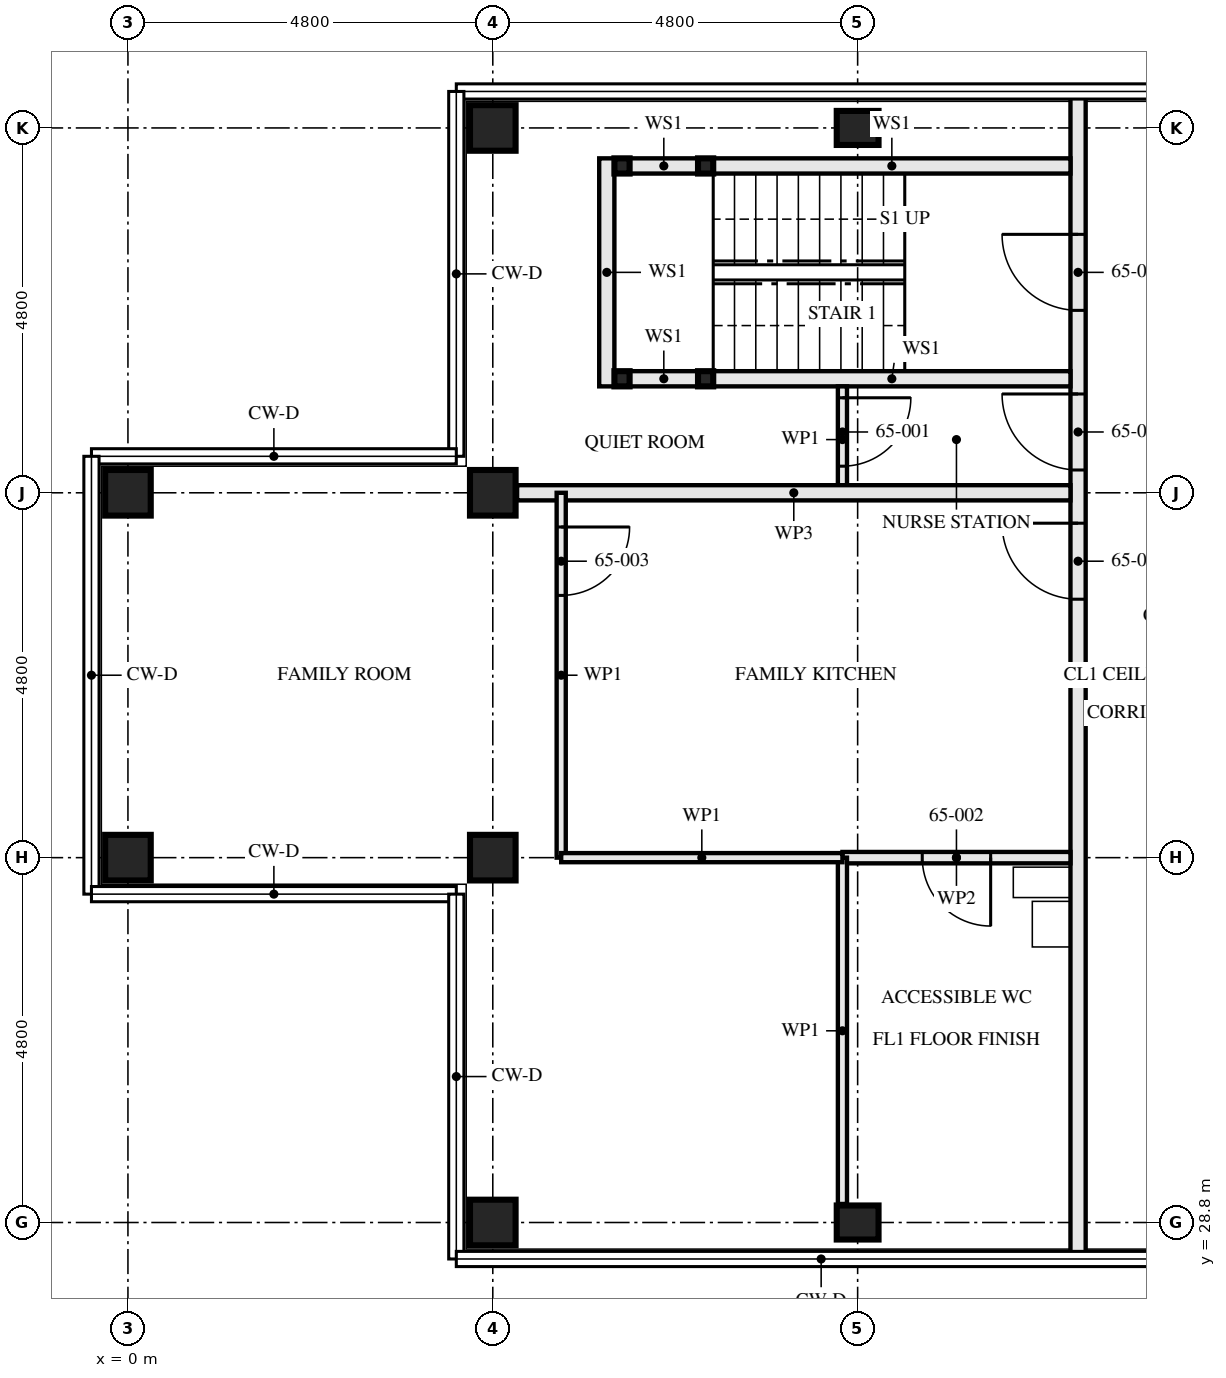
"""IFC4 building model, lengths in metres.
Left out: names, types, materials, properties, quantities, classifications, styles, units other than length and angle.
Written with IfcOpenShell. Run it as: python <this file> out.ifc"""

import sys

from ifc_helpers import new_model, si_unit, direction, frame, frame_2d, origin, origin_2d, place, context, subcontext, project, spatial, rectangle, hollow_rectangle, i_section, extrude, element, fill, save


model = new_model("IFC4")
c1 = context("Model", 3, precision=1e-05, world=origin(), true_north=direction((0.0, 1.0)))
c2 = subcontext(c1, "Body", "Model", "MODEL_VIEW")
j1 = project(units=[si_unit("LENGTHUNIT", "METRE"), si_unit("PLANEANGLEUNIT", "RADIAN")], contexts=[c1])
p1 = place(None, origin())
s1 = spatial("IfcSite", under=j1, at=p1, CompositionType="ELEMENT")
p2 = place(p1, origin())
s2 = spatial("IfcBuilding", under=s1, at=p2, CompositionType="ELEMENT")
p3 = place(p2, frame((0.0, 0.0, 236.5)))
s3 = spatial("IfcBuildingStorey", under=s2, at=p3, CompositionType="ELEMENT", Elevation=236.5)
for number, where, z_axis, x_axis in (
    (1, (0.0, 33.6, 0.0), (0.0, 0.0, 1.0), (0.0, 1.0, 0.0)),
    (2, (0.0, 38.4, 0.0), (0.0, 0.0, 1.0), (0.0, 1.0, 0.0)),
    (3, (4.8, 28.8, 0.0), (0.0, 0.0, 1.0), (0.0, 1.0, 0.0)),
    (4, (4.8, 33.6, 0.0), (0.0, 0.0, 1.0), (0.0, 1.0, 0.0)),
    (5, (4.8, 38.4, 0.0), (0.0, 0.0, 1.0), (0.0, 1.0, 0.0)),
    (6, (4.8, 43.2, 0.0), (0.0, 0.0, 1.0), (0.0, 1.0, 0.0)),
):
    element("IfcColumn", number, at=place(p3, frame(where, z_axis=z_axis, x_axis=x_axis)), inside=s3, PredefinedType="COLUMN", context=c2, shape_type="SweptSolid", body=[
        extrude(hollow_rectangle(XDim=0.6, YDim=0.6, WallThickness=0.05, at=origin_2d()), origin(), (0.0, 0.0, 1.0), 3.5),
    ])
for number, where, z_axis, x_axis in (
    (7, (9.6, 28.8, 0.0), (0.0, 0.0, 1.0), (0.0, 1.0, 0.0)),
    (8, (9.6, 43.2, 0.0), (0.0, 0.0, 1.0), (0.0, 1.0, 0.0)),
):
    element("IfcColumn", number, at=place(p3, frame(where, z_axis=z_axis, x_axis=x_axis)), inside=s3, PredefinedType="COLUMN", context=c2, shape_type="SweptSolid", body=[
        extrude(i_section(OverallWidth=0.448, OverallDepth=0.55, WebThickness=0.072, FlangeThickness=0.115, FilletRadius=0.015, at=origin_2d()), origin(), (0.0, 0.0, 1.0), 3.5),
    ])
for number, where, z_axis, x_axis in (
    (9, (6.5, 42.7, 0.0), (0.0, 0.0, 1.0), (1.0, 0.0, 0.0)),
    (10, (6.5, 39.9, 0.0), (0.0, 0.0, 1.0), (1.0, 0.0, 0.0)),
    (11, (7.6, 42.7, 0.0), (0.0, 0.0, 1.0), (1.0, 0.0, 0.0)),
    (12, (7.6, 39.9, 0.0), (0.0, 0.0, 1.0), (1.0, 0.0, 0.0)),
):
    element("IfcColumn", number, at=place(p3, frame(where, z_axis=z_axis, x_axis=x_axis)), inside=s3, PredefinedType="COLUMN", context=c2, shape_type="SweptSolid", body=[
        extrude(hollow_rectangle(XDim=0.2, YDim=0.2, WallThickness=0.008, at=origin_2d()), origin(), (0.0, 0.0, 1.0), 3.33),
    ])
p4 = place(p3, frame((6.6, 42.7, 0.0), z_axis=(0.0, 0.0, 1.0), x_axis=(1.0, 0.0, 0.0)))
e13 = element("IfcWall", 13, at=p4, inside=s3, PredefinedType="SOLIDWALL", context=c2, shape_type="SweptSolid", body=[
    extrude(rectangle(XDim=0.9, YDim=0.2, at=frame_2d((0.45, 0.0))), origin(), (0.0, 0.0, 1.0), 2.99),
])
p5 = place(p3, frame((7.7, 42.7, 0.0), z_axis=(0.0, 0.0, 1.0), x_axis=(1.0, 0.0, 0.0)))
e14 = element("IfcWall", 14, at=p5, inside=s3, PredefinedType="SOLIDWALL", context=c2, shape_type="SweptSolid", body=[
    extrude(rectangle(XDim=4.7, YDim=0.2, at=frame_2d((2.35, 0.0))), origin(), (0.0, 0.0, 1.0), 2.99),
])
p6 = place(p3, frame((6.6, 39.9, 0.0), z_axis=(0.0, 0.0, 1.0), x_axis=(1.0, 0.0, 0.0)))
e15 = element("IfcWall", 15, at=p6, inside=s3, PredefinedType="SOLIDWALL", context=c2, shape_type="SweptSolid", body=[
    extrude(rectangle(XDim=0.9, YDim=0.2, at=frame_2d((0.45, 0.0))), origin(), (0.0, 0.0, 1.0), 2.99),
])
p7 = place(p3, frame((7.7, 39.9, 0.0), z_axis=(0.0, 0.0, 1.0), x_axis=(1.0, 0.0, 0.0)))
e16 = element("IfcWall", 16, at=p7, inside=s3, PredefinedType="SOLIDWALL", context=c2, shape_type="SweptSolid", body=[
    extrude(rectangle(XDim=4.7, YDim=0.2, at=frame_2d((2.35, 0.0))), origin(), (0.0, 0.0, 1.0), 2.99),
])
p8 = place(p3, frame((6.3, 42.8, 0.0), z_axis=(0.0, 0.0, 1.0), x_axis=(0.0, -1.0, 0.0)))
e17 = element("IfcWall", 17, at=p8, inside=s3, PredefinedType="SOLIDWALL", context=c2, shape_type="SweptSolid", body=[
    extrude(rectangle(XDim=3.0, YDim=0.2, at=frame_2d((1.5, 0.0))), origin(), (0.0, 0.0, 1.0), 3.33),
])
p9 = place(p3, frame((9.4, 39.8, 0.0), z_axis=(0.0, 0.0, 1.0), x_axis=(0.0, -1.0, 0.0)))
e18 = element("IfcWall", 18, at=p9, inside=s3, PredefinedType="PARTITIONING", context=c2, shape_type="SweptSolid", body=[
    extrude(rectangle(XDim=1.4, YDim=0.12, at=frame_2d((0.7, 0.0))), origin(), (0.0, 0.0, 1.0), 3.33),
])
p10 = place(p9, frame((0.15, 0.0, 0.0)))
e19 = element("IfcOpeningElement", 19, at=p10, cuts=e18, PredefinedType="OPENING", context=c2, shape_type="SweptSolid", body=[
    extrude(rectangle(XDim=0.9, YDim=2.1, at=frame_2d((0.45, 1.05))), frame((0.0, 0.071, 0.0), z_axis=(0.0, -1.0, 0.0), x_axis=(1.0, 0.0, 0.0)), (0.0, 0.0, 1.0), 0.141),
])
p11 = place(p3, frame((5.12, 38.4, 0.0), z_axis=(0.0, 0.0, 1.0), x_axis=(1.0, 0.0, 0.0)))
e20 = element("IfcWall", 20, at=p11, inside=s3, PredefinedType="PARTITIONING", context=c2, shape_type="SweptSolid", body=[
    extrude(rectangle(XDim=7.28, YDim=0.2, at=frame_2d((3.64, 0.0))), origin(), (0.0, 0.0, 1.0), 2.55),
])
p12 = place(p3, frame((9.4, 33.6, 0.0), z_axis=(0.0, 0.0, 1.0), x_axis=(1.0, 0.0, 0.0)))
e21 = element("IfcWall", 21, at=p12, inside=s3, PredefinedType="PARTITIONING", context=c2, shape_type="SweptSolid", body=[
    extrude(rectangle(XDim=3.0, YDim=0.15, at=frame_2d((1.5, 0.0))), origin(), (0.0, 0.0, 1.0), 2.55),
])
p13 = place(p12, frame((1.05, 0.0, 0.0)))
e22 = element("IfcOpeningElement", 22, at=p13, cuts=e21, PredefinedType="OPENING", context=c2, shape_type="SweptSolid", body=[
    extrude(rectangle(XDim=0.9, YDim=2.1, at=frame_2d((0.45, 1.05))), frame((0.0, 0.085, 0.0), z_axis=(0.0, -1.0, 0.0), x_axis=(1.0, 0.0, 0.0)), (0.0, 0.0, 1.0), 0.171),
])
p14 = place(p3, frame((5.7, 38.4, 0.0), z_axis=(0.0, 0.0, 1.0), x_axis=(0.0, -1.0, 0.0)))
e23 = element("IfcWall", 23, at=p14, inside=s3, PredefinedType="PARTITIONING", context=c2, shape_type="SweptSolid", body=[
    extrude(rectangle(XDim=4.8, YDim=0.12, at=frame_2d((2.4, 0.0))), origin(), (0.0, 0.0, 1.0), 3.33),
])
p15 = place(p14, frame((0.45, 0.0, 0.0)))
e24 = element("IfcOpeningElement", 24, at=p15, cuts=e23, PredefinedType="OPENING", context=c2, shape_type="SweptSolid", body=[
    extrude(rectangle(XDim=0.9, YDim=2.1, at=frame_2d((0.45, 1.05))), frame((0.0, 0.071, 0.0), z_axis=(0.0, -1.0, 0.0), x_axis=(1.0, 0.0, 0.0)), (0.0, 0.0, 1.0), 0.141),
])
p16 = place(p3, frame((9.4, 33.6, 0.0), z_axis=(0.0, 0.0, 1.0), x_axis=(0.0, -1.0, 0.0)))
e25 = element("IfcWall", 25, at=p16, inside=s3, PredefinedType="PARTITIONING", context=c2, shape_type="SweptSolid", body=[
    extrude(rectangle(XDim=4.556, YDim=0.12, at=frame_2d((2.278, 0.0))), origin(), (0.0, 0.0, 1.0), 3.33),
])
p17 = place(p3, frame((5.7, 33.6, 0.0), z_axis=(0.0, 0.0, 1.0), x_axis=(1.0, 0.0, 0.0)))
e26 = element("IfcWall", 26, at=p17, inside=s3, PredefinedType="PARTITIONING", context=c2, shape_type="SweptSolid", body=[
    extrude(rectangle(XDim=3.7, YDim=0.12, at=frame_2d((1.85, 0.0))), origin(), (0.0, 0.0, 1.0), 2.55),
])
p18 = place(p3, frame((12.5, 43.655, 0.0), z_axis=(0.0, 0.0, 1.0), x_axis=(0.0, -1.0, 0.0)))
e27 = element("IfcWall", 27, at=p18, inside=s3, PredefinedType="PARTITIONING", context=c2, shape_type="SweptSolid", body=[
    extrude(rectangle(XDim=15.31, YDim=0.2, at=frame_2d((7.655, 0.0))), origin(), (0.0, 0.0, 1.0), 2.32),
])
p19 = place(p18, frame((1.855, 0.0, 0.0)))
e28 = element("IfcOpeningElement", 28, at=p19, cuts=e27, PredefinedType="OPENING", context=c2, shape_type="SweptSolid", body=[
    extrude(rectangle(XDim=1.0, YDim=2.1, at=frame_2d((0.5, 1.05))), frame((0.0, 0.111, 0.0), z_axis=(0.0, -1.0, 0.0), x_axis=(1.0, 0.0, 0.0)), (0.0, 0.0, 1.0), 0.221),
])
p20 = place(p18, frame((3.955, 0.0, 0.0)))
e29 = element("IfcOpeningElement", 29, at=p20, cuts=e27, PredefinedType="OPENING", context=c2, shape_type="SweptSolid", body=[
    extrude(rectangle(XDim=1.0, YDim=2.1, at=frame_2d((0.5, 1.05))), frame((0.0, 0.111, 0.0), z_axis=(0.0, -1.0, 0.0), x_axis=(1.0, 0.0, 0.0)), (0.0, 0.0, 1.0), 0.221),
])
p21 = place(p18, frame((5.655, 0.0, 0.0)))
e30 = element("IfcOpeningElement", 30, at=p21, cuts=e27, PredefinedType="OPENING", context=c2, shape_type="SweptSolid", body=[
    extrude(rectangle(XDim=1.0, YDim=2.1, at=frame_2d((0.5, 1.05))), frame((0.0, 0.111, 0.0), z_axis=(0.0, -1.0, 0.0), x_axis=(1.0, 0.0, 0.0)), (0.0, 0.0, 1.0), 0.221),
])
p22 = place(p10, origin())
e31 = element("IfcDoor", 31, at=p22, inside=s3, OperationType="SINGLE_SWING_RIGHT", PredefinedType="DOOR", context=c2, shape_type="SweptSolid", body=[
    extrude(rectangle(XDim=0.9, YDim=2.1, at=frame_2d((0.45, 1.05))), frame((0.0, 0.022, 0.0), z_axis=(0.0, -1.0, 0.0), x_axis=(1.0, 0.0, 0.0)), (0.0, 0.0, 1.0), 0.044),
])
fill(e19, e31)
p23 = place(p13, frame((0.9, 0.0, 0.0), z_axis=(0.0, 0.0, 1.0), x_axis=(-1.0, 0.0, 0.0)))
e32 = element("IfcDoor", 32, at=p23, inside=s3, OperationType="SINGLE_SWING_RIGHT", PredefinedType="DOOR", context=c2, shape_type="SweptSolid", body=[
    extrude(rectangle(XDim=0.9, YDim=2.1, at=frame_2d((0.45, 1.05))), frame((0.0, 0.022, 0.0), z_axis=(0.0, -1.0, 0.0), x_axis=(1.0, 0.0, 0.0)), (0.0, 0.0, 1.0), 0.044),
])
fill(e22, e32)
p24 = place(p15, origin())
e33 = element("IfcDoor", 33, at=p24, inside=s3, OperationType="SINGLE_SWING_RIGHT", PredefinedType="DOOR", context=c2, shape_type="SweptSolid", body=[
    extrude(rectangle(XDim=0.9, YDim=2.1, at=frame_2d((0.45, 1.05))), frame((0.0, 0.022, 0.0), z_axis=(0.0, -1.0, 0.0), x_axis=(1.0, 0.0, 0.0)), (0.0, 0.0, 1.0), 0.044),
])
fill(e24, e33)
p25 = place(p19, frame((1.0, 0.0, 0.0), z_axis=(0.0, 0.0, 1.0), x_axis=(-1.0, 0.0, 0.0)))
e34 = element("IfcDoor", 34, at=p25, inside=s3, OperationType="SINGLE_SWING_LEFT", PredefinedType="DOOR", context=c2, shape_type="SweptSolid", body=[
    extrude(rectangle(XDim=1.0, YDim=2.1, at=frame_2d((0.5, 1.05))), frame((0.0, 0.032, 0.0), z_axis=(0.0, -1.0, 0.0), x_axis=(1.0, 0.0, 0.0)), (0.0, 0.0, 1.0), 0.064),
])
fill(e28, e34)
p26 = place(p20, frame((1.0, 0.0, 0.0), z_axis=(0.0, 0.0, 1.0), x_axis=(-1.0, 0.0, 0.0)))
e35 = element("IfcDoor", 35, at=p26, inside=s3, OperationType="SINGLE_SWING_LEFT", PredefinedType="DOOR", context=c2, shape_type="SweptSolid", body=[
    extrude(rectangle(XDim=1.0, YDim=2.1, at=frame_2d((0.5, 1.05))), frame((0.0, 0.027, 0.0), z_axis=(0.0, -1.0, 0.0), x_axis=(1.0, 0.0, 0.0)), (0.0, 0.0, 1.0), 0.054),
])
fill(e29, e35)
p27 = place(p21, frame((1.0, 0.0, 0.0), z_axis=(0.0, 0.0, 1.0), x_axis=(-1.0, 0.0, 0.0)))
e36 = element("IfcDoor", 36, at=p27, inside=s3, OperationType="SINGLE_SWING_LEFT", PredefinedType="DOOR", context=c2, shape_type="SweptSolid", body=[
    extrude(rectangle(XDim=1.0, YDim=2.1, at=frame_2d((0.5, 1.05))), frame((0.0, 0.027, 0.0), z_axis=(0.0, -1.0, 0.0), x_axis=(1.0, 0.0, 0.0)), (0.0, 0.0, 1.0), 0.054),
])
fill(e30, e36)
save(model, sys.argv[1])
